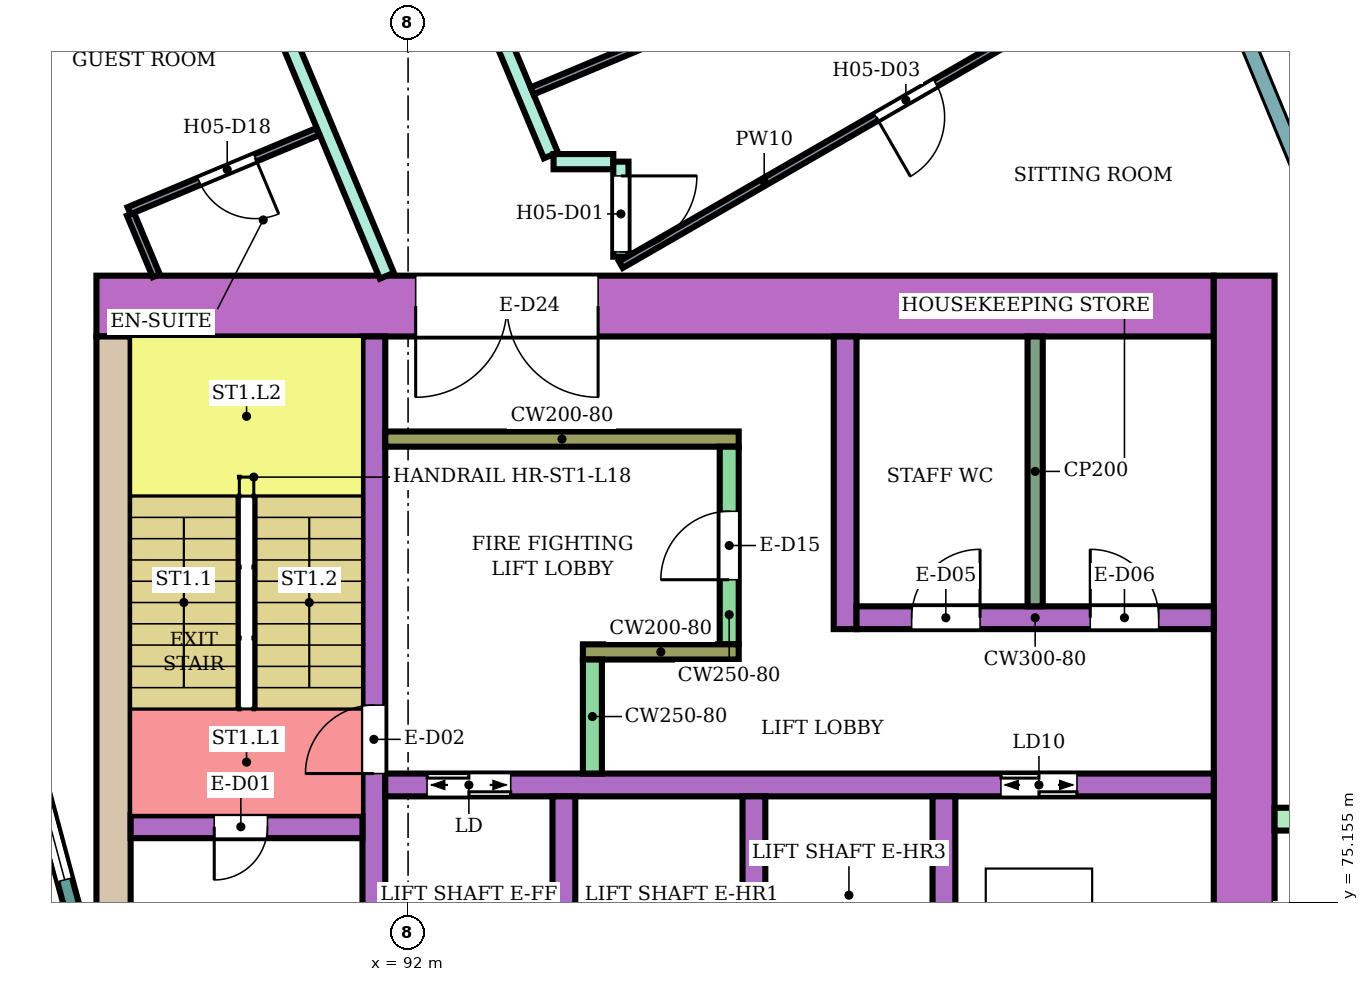
"""IFC4 building model, lengths in metres.
Left out: names, types, materials, properties, quantities, classifications, styles, units other than length and angle.
Written with IfcOpenShell. Run it as: python <this file> out.ifc"""

import sys

from ifc_helpers import new_model, si_unit, direction, frame, frame_2d, origin, place, context, subcontext, project, spatial, rectangle, extrude, element, fill, save


model = new_model("IFC4")
c1 = context("Model", 3, precision=1e-05, world=origin(), true_north=direction((0.0, 1.0)))
c2 = subcontext(c1, "Body", "Model", "MODEL_VIEW")
j1 = project(units=[si_unit("LENGTHUNIT", "METRE"), si_unit("PLANEANGLEUNIT", "RADIAN")], contexts=[c1])
p1 = place(None, origin())
s1 = spatial("IfcSite", under=j1, at=p1, CompositionType="ELEMENT")
p2 = place(p1, origin())
s2 = spatial("IfcBuilding", under=s1, at=p2, CompositionType="ELEMENT")
p3 = place(p2, frame((0.0, 0.0, 82.4)))
s3 = spatial("IfcBuildingStorey", under=s2, at=p3, CompositionType="ELEMENT", Elevation=82.4)
p4 = place(p3, frame((87.9, 83.0, 0.0), z_axis=(0.0, 0.0, 1.0), x_axis=(1.0, 0.0, 0.0)))
e1 = element("IfcWall", 1, at=p4, inside=s3, PredefinedType="SHEAR", context=c2, shape_type="SweptSolid", body=[
    extrude(rectangle(XDim=14.7, YDim=0.8, at=frame_2d((7.35, 0.0))), origin(), (0.0, 0.0, 1.0), 3.48),
])
p5 = place(p4, frame((4.2, 0.0, 0.0)))
e2 = element("IfcOpeningElement", 2, at=p5, cuts=e1, PredefinedType="OPENING", context=c2, shape_type="SweptSolid", body=[
    extrude(rectangle(XDim=2.4, YDim=2.4, at=frame_2d((1.2, 1.2))), frame((0.0, 0.41, 0.0), z_axis=(0.0, -1.0, 0.0), x_axis=(1.0, 0.0, 0.0)), (0.0, 0.0, 1.0), 0.82),
])
p6 = place(p3, frame((88.125, 75.0, 0.0), z_axis=(0.0, 0.0, 1.0), x_axis=(0.0, 1.0, 0.0)))
e3 = element("IfcWall", 3, at=p6, inside=s3, PredefinedType="SHEAR", context=c2, shape_type="SweptSolid", body=[
    extrude(rectangle(XDim=7.6, YDim=0.45, at=frame_2d((3.8, 0.0))), origin(), (0.0, 0.0, 1.0), 3.48),
])
p7 = place(p3, frame((103.0, 66.6, 0.0), z_axis=(0.0, 0.0, 1.0), x_axis=(0.0, 1.0, 0.0)))
e4 = element("IfcWall", 4, at=p7, inside=s3, PredefinedType="SHEAR", context=c2, shape_type="SweptSolid", body=[
    extrude(rectangle(XDim=16.8, YDim=0.8, at=frame_2d((8.4, 0.0))), origin(), (0.0, 0.0, 1.0), 3.48),
])
p8 = place(p3, frame((91.55, 75.0, 0.0), z_axis=(0.0, 0.0, 1.0), x_axis=(0.0, 1.0, 0.0)))
e5 = element("IfcWall", 5, at=p8, inside=s3, PredefinedType="SHEAR", context=c2, shape_type="SweptSolid", body=[
    extrude(rectangle(XDim=7.6, YDim=0.3, at=frame_2d((3.8, 0.0))), origin(), (0.0, 0.0, 1.0), 3.48),
])
p9 = place(p8, frame((1.85, 0.0, 0.0)))
e6 = element("IfcOpeningElement", 6, at=p9, cuts=e5, PredefinedType="OPENING", context=c2, shape_type="SweptSolid", body=[
    extrude(rectangle(XDim=0.9, YDim=2.1, at=frame_2d((0.45, 1.05))), frame((0.0, 0.16, 0.0), z_axis=(0.0, -1.0, 0.0), x_axis=(1.0, 0.0, 0.0)), (0.0, 0.0, 1.0), 0.32),
])
p10 = place(p3, frame((88.35, 76.15, 0.0), z_axis=(0.0, 0.0, 1.0), x_axis=(1.0, 0.0, 0.0)))
e7 = element("IfcWall", 7, at=p10, inside=s3, PredefinedType="SHEAR", context=c2, shape_type="SweptSolid", body=[
    extrude(rectangle(XDim=3.05, YDim=0.3, at=frame_2d((1.525, 0.0))), origin(), (0.0, 0.0, 1.0), 3.48),
])
p11 = place(p10, frame((1.1, 0.0, 0.0)))
e8 = element("IfcOpeningElement", 8, at=p11, cuts=e7, PredefinedType="OPENING", context=c2, shape_type="SweptSolid", body=[
    extrude(rectangle(XDim=0.7, YDim=2.0, at=frame_2d((0.35, 1.0))), frame((0.0, 0.16, 0.0), z_axis=(0.0, -1.0, 0.0), x_axis=(1.0, 0.0, 0.0)), (0.0, 0.0, 1.0), 0.32),
])
p12 = place(p3, frame((91.7, 76.7, 0.0), z_axis=(0.0, 0.0, 1.0), x_axis=(1.0, 0.0, 0.0)))
e9 = element("IfcWall", 9, at=p12, inside=s3, PredefinedType="SHEAR", context=c2, shape_type="SweptSolid", body=[
    extrude(rectangle(XDim=10.9, YDim=0.3, at=frame_2d((5.45, 0.0))), origin(), (0.0, 0.0, 1.0), 3.48),
])
p13 = place(p12, frame((0.55, 0.0, 0.0)))
e10 = element("IfcOpeningElement", 10, at=p13, cuts=e9, PredefinedType="OPENING", context=c2, shape_type="SweptSolid", body=[
    extrude(rectangle(XDim=1.1, YDim=2.1, at=frame_2d((0.55, 1.05))), frame((0.0, 0.16, 0.0), z_axis=(0.0, -1.0, 0.0), x_axis=(1.0, 0.0, 0.0)), (0.0, 0.0, 1.0), 0.32),
])
p14 = place(p12, frame((8.1, 0.0, 0.0)))
e11 = element("IfcOpeningElement", 11, at=p14, cuts=e9, PredefinedType="OPENING", context=c2, shape_type="SweptSolid", body=[
    extrude(rectangle(XDim=1.0, YDim=2.1, at=frame_2d((0.5, 1.05))), frame((0.0, 0.16, 0.0), z_axis=(0.0, -1.0, 0.0), x_axis=(1.0, 0.0, 0.0)), (0.0, 0.0, 1.0), 0.32),
])
for number, where, z_axis, x_axis in (
    (12, (94.05, 74.0, 0.0), (0.0, 0.0, 1.0), (0.0, 1.0, 0.0)),
    (13, (96.55, 74.0, 0.0), (0.0, 0.0, 1.0), (0.0, 1.0, 0.0)),
    (14, (99.05, 74.0, 0.0), (0.0, 0.0, 1.0), (0.0, 1.0, 0.0)),
):
    element("IfcWall", number, at=place(p3, frame(where, z_axis=z_axis, x_axis=x_axis)), inside=s3, PredefinedType="SHEAR", context=c2, shape_type="SweptSolid", body=[
        extrude(rectangle(XDim=2.55, YDim=0.3, at=frame_2d((1.275, 0.0))), origin(), (0.0, 0.0, 1.0), 3.48),
    ])
p15 = place(p3, frame((91.7, 81.25, 0.0), z_axis=(0.0, 0.0, 1.0), x_axis=(1.0, 0.0, 0.0)))
e15 = element("IfcWall", 15, at=p15, inside=s3, PredefinedType="SHEAR", context=c2, shape_type="SweptSolid", body=[
    extrude(rectangle(XDim=4.65, YDim=0.2, at=frame_2d((2.325, 0.0))), origin(), (0.0, 0.0, 1.0), 3.48),
])
p16 = place(p3, frame((96.225, 78.55, 0.0), z_axis=(0.0, 0.0, 1.0), x_axis=(0.0, 1.0, 0.0)))
e16 = element("IfcWall", 16, at=p16, inside=s3, PredefinedType="SHEAR", context=c2, shape_type="SweptSolid", body=[
    extrude(rectangle(XDim=2.6, YDim=0.25, at=frame_2d((1.3, 0.0))), origin(), (0.0, 0.0, 1.0), 3.48),
])
p17 = place(p16, frame((0.85, 0.0, 0.0)))
e17 = element("IfcOpeningElement", 17, at=p17, cuts=e16, PredefinedType="OPENING", context=c2, shape_type="SweptSolid", body=[
    extrude(rectangle(XDim=0.9, YDim=2.1, at=frame_2d((0.45, 1.05))), frame((0.0, 0.135, 0.0), z_axis=(0.0, -1.0, 0.0), x_axis=(1.0, 0.0, 0.0)), (0.0, 0.0, 1.0), 0.27),
])
p18 = place(p3, frame((94.3, 78.45, 0.0), z_axis=(0.0, 0.0, 1.0), x_axis=(1.0, 0.0, 0.0)))
e18 = element("IfcWall", 18, at=p18, inside=s3, PredefinedType="SHEAR", context=c2, shape_type="SweptSolid", body=[
    extrude(rectangle(XDim=2.05, YDim=0.2, at=frame_2d((1.025, 0.0))), origin(), (0.0, 0.0, 1.0), 3.48),
])
p19 = place(p3, frame((94.425, 76.85, 0.0), z_axis=(0.0, 0.0, 1.0), x_axis=(0.0, 1.0, 0.0)))
e19 = element("IfcWall", 19, at=p19, inside=s3, PredefinedType="SHEAR", context=c2, shape_type="SweptSolid", body=[
    extrude(rectangle(XDim=1.5, YDim=0.25, at=frame_2d((0.75, 0.0))), origin(), (0.0, 0.0, 1.0), 3.48),
])
p20 = place(p3, frame((97.75, 78.75, 0.0), z_axis=(0.0, 0.0, 1.0), x_axis=(0.0, 1.0, 0.0)))
e20 = element("IfcWall", 20, at=p20, inside=s3, PredefinedType="SHEAR", context=c2, shape_type="SweptSolid", body=[
    extrude(rectangle(XDim=3.85, YDim=0.3, at=frame_2d((1.925, 0.0))), origin(), (0.0, 0.0, 1.0), 3.48),
])
p21 = place(p3, frame((97.9, 78.9, 0.0), z_axis=(0.0, 0.0, 1.0), x_axis=(1.0, 0.0, 0.0)))
e21 = element("IfcWall", 21, at=p21, inside=s3, PredefinedType="SHEAR", context=c2, shape_type="SweptSolid", body=[
    extrude(rectangle(XDim=4.7, YDim=0.3, at=frame_2d((2.35, 0.0))), origin(), (0.0, 0.0, 1.0), 3.48),
])
p22 = place(p21, frame((0.725, 0.0, 0.0)))
e22 = element("IfcOpeningElement", 22, at=p22, cuts=e21, PredefinedType="OPENING", context=c2, shape_type="SweptSolid", body=[
    extrude(rectangle(XDim=0.9, YDim=2.1, at=frame_2d((0.45, 1.05))), frame((0.0, 0.16, 0.0), z_axis=(0.0, -1.0, 0.0), x_axis=(1.0, 0.0, 0.0)), (0.0, 0.0, 1.0), 0.32),
])
p23 = place(p21, frame((3.075, 0.0, 0.0)))
e23 = element("IfcOpeningElement", 23, at=p23, cuts=e21, PredefinedType="OPENING", context=c2, shape_type="SweptSolid", body=[
    extrude(rectangle(XDim=0.9, YDim=2.1, at=frame_2d((0.45, 1.05))), frame((0.0, 0.16, 0.0), z_axis=(0.0, -1.0, 0.0), x_axis=(1.0, 0.0, 0.0)), (0.0, 0.0, 1.0), 0.32),
])
p24 = place(p3, frame((103.4, 76.25, 0.0), z_axis=(0.0, 0.0, 1.0), x_axis=(1.0, 0.0, 0.0)))
e24 = element("IfcWall", 24, at=p24, inside=s3, PredefinedType="NOTDEFINED", context=c2, shape_type="SweptSolid", body=[
    extrude(rectangle(XDim=2.416, YDim=0.3, at=frame_2d((1.208, 0.0))), origin(), (0.0, 0.0, 1.0), 3.8),
])
p25 = place(p3, frame((87.604, 75.0, 0.0), z_axis=(0.0, 0.0, 1.0), x_axis=(-0.258789828301, 0.965933654434, 0.0)))
e25 = element("IfcWall", 25, at=p25, inside=s3, PredefinedType="NOTDEFINED", context=c2, shape_type="SweptSolid", body=[
    extrude(rectangle(XDim=3.936, YDim=0.2, at=frame_2d((1.968, 0.0))), origin(), (0.0, 0.0, 1.0), 3.8),
])
p26 = place(p25, frame((0.468, 0.0, 0.9)))
e26 = element("IfcOpeningElement", 26, at=p26, cuts=e25, PredefinedType="OPENING", context=c2, shape_type="SweptSolid", body=[
    extrude(rectangle(XDim=3.0, YDim=2.3, at=frame_2d((1.5, 1.15))), frame((0.0, 0.11, 0.0), z_axis=(0.0, -1.0, 0.0), x_axis=(1.0, 0.0, 0.0)), (0.0, 0.0, 1.0), 0.22),
])
p27 = place(p3, frame((83.85, 81.667, 0.0), z_axis=(0.0, 0.0, 1.0), x_axis=(0.500222212082, 0.865897071562, 0.0)))
e27 = element("IfcWall", 27, at=p27, inside=s3, PredefinedType="PARTITIONING", context=c2, shape_type="SweptSolid", body=[
    extrude(rectangle(XDim=9.768, YDim=0.2, at=frame_2d((4.884, 0.0))), origin(), (0.0, 0.0, 1.0), 3.35),
])
p28 = place(p3, frame((88.698, 90.624, 0.0), z_axis=(0.0, 0.0, 1.0), x_axis=(0.386027055918, -0.922487459047, 0.0)))
e28 = element("IfcWall", 28, at=p28, inside=s3, PredefinedType="PARTITIONING", context=c2, shape_type="SweptSolid", body=[
    extrude(rectangle(XDim=7.832, YDim=0.2, at=frame_2d((3.916, 0.0))), origin(), (0.0, 0.0, 1.0), 3.35),
])
p29 = place(p28, frame((1.482, 0.0, 0.0)))
e29 = element("IfcOpeningElement", 29, at=p29, cuts=e28, PredefinedType="OPENING", context=c2, shape_type="SweptSolid", body=[
    extrude(rectangle(XDim=1.0, YDim=2.1, at=frame_2d((0.5, 1.05))), frame((0.0, 0.11, 0.0), z_axis=(0.0, -1.0, 0.0), x_axis=(1.0, 0.0, 0.0)), (0.0, 0.0, 1.0), 0.22),
])
p30 = place(p3, frame((90.604, 92.805, 0.0), z_axis=(0.0, 0.0, 1.0), x_axis=(0.386209298583, -0.922411176042, 0.0)))
e30 = element("IfcWall", 30, at=p30, inside=s3, PredefinedType="PARTITIONING", context=c2, shape_type="SweptSolid", body=[
    extrude(rectangle(XDim=8.48, YDim=0.2, at=frame_2d((4.24, 0.0))), origin(), (0.0, 0.0, 1.0), 3.35),
])
p31 = place(p30, frame((3.723, 0.0, 0.0)))
e31 = element("IfcOpeningElement", 31, at=p31, cuts=e30, PredefinedType="OPENING", context=c2, shape_type="SweptSolid", body=[
    extrude(rectangle(XDim=1.1, YDim=2.1, at=frame_2d((0.55, 1.05))), frame((0.0, 0.11, 0.0), z_axis=(0.0, -1.0, 0.0), x_axis=(1.0, 0.0, 0.0)), (0.0, 0.0, 1.0), 0.22),
])
p32 = place(p3, frame((93.914, 84.9, 0.0), z_axis=(0.0, 0.0, 1.0), x_axis=(1.0, 0.0, 0.0)))
e32 = element("IfcWall", 32, at=p32, inside=s3, PredefinedType="PARTITIONING", context=c2, shape_type="SweptSolid", body=[
    extrude(rectangle(XDim=0.786, YDim=0.2, at=frame_2d((0.393, 0.0))), origin(), (0.0, 0.0, 1.0), 3.35),
])
p33 = place(p3, frame((94.8, 83.65, 0.0), z_axis=(0.0, 0.0, 1.0), x_axis=(0.0, 1.0, 0.0)))
e33 = element("IfcWall", 33, at=p33, inside=s3, PredefinedType="PARTITIONING", context=c2, shape_type="SweptSolid", body=[
    extrude(rectangle(XDim=1.25, YDim=0.2, at=frame_2d((0.625, 0.0))), origin(), (0.0, 0.0, 1.0), 3.35),
])
p34 = place(p33, frame((0.062, 0.0, 0.0)))
e34 = element("IfcOpeningElement", 34, at=p34, cuts=e33, PredefinedType="OPENING", context=c2, shape_type="SweptSolid", body=[
    extrude(rectangle(XDim=1.0, YDim=2.1, at=frame_2d((0.5, 1.05))), frame((0.0, 0.11, 0.0), z_axis=(0.0, -1.0, 0.0), x_axis=(1.0, 0.0, 0.0)), (0.0, 0.0, 1.0), 0.22),
])
p35 = place(p3, frame((88.348, 84.209, 0.0), z_axis=(0.0, 0.0, 1.0), x_axis=(0.386077497504, -0.922466349479, 0.0)))
e35 = element("IfcWall", 35, at=p35, inside=s3, PredefinedType="PARTITIONING", context=c2, shape_type="SweptSolid", body=[
    extrude(rectangle(XDim=0.877, YDim=0.1, at=frame_2d((0.438, 0.0))), origin(), (0.0, 0.0, 1.0), 3.35),
])
p36 = place(p3, frame((88.329, 84.255, 0.0), z_axis=(0.0, 0.0, 1.0), x_axis=(0.922320663728, 0.386425404522, 0.0)))
e36 = element("IfcWall", 36, at=p36, inside=s3, PredefinedType="PARTITIONING", context=c2, shape_type="SweptSolid", body=[
    extrude(rectangle(XDim=2.69, YDim=0.1, at=frame_2d((1.345, 0.0))), origin(), (0.0, 0.0, 1.0), 3.35),
])
p37 = place(p36, frame((1.0, 0.0, 0.0)))
e37 = element("IfcOpeningElement", 37, at=p37, cuts=e36, PredefinedType="OPENING", context=c2, shape_type="SweptSolid", body=[
    extrude(rectangle(XDim=0.8, YDim=2.1, at=frame_2d((0.4, 1.05))), frame((0.0, 0.06, 0.0), z_axis=(0.0, -1.0, 0.0), x_axis=(1.0, 0.0, 0.0)), (0.0, 0.0, 1.0), 0.12),
])
p38 = place(p3, frame((93.633, 85.831, 0.0), z_axis=(0.0, 0.0, 1.0), x_axis=(0.922344808264, 0.38636777126, 0.0)))
e38 = element("IfcWall", 38, at=p38, inside=s3, PredefinedType="PARTITIONING", context=c2, shape_type="SweptSolid", body=[
    extrude(rectangle(XDim=2.65, YDim=0.1, at=frame_2d((1.325, 0.0))), origin(), (0.0, 0.0, 1.0), 3.35),
])
p39 = place(p3, frame((94.8, 83.545, 0.0), z_axis=(0.0, 0.0, 1.0), x_axis=(0.86602264145, 0.500004784474, 0.0)))
e39 = element("IfcWall", 39, at=p39, inside=s3, PredefinedType="PARTITIONING", context=c2, shape_type="SweptSolid", body=[
    extrude(rectangle(XDim=8.708, YDim=0.1, at=frame_2d((4.354, 0.0))), origin(), (0.0, 0.0, 1.0), 3.35),
])
p40 = place(p39, frame((3.879, 0.0, 0.0)))
e40 = element("IfcOpeningElement", 40, at=p40, cuts=e39, PredefinedType="OPENING", context=c2, shape_type="SweptSolid", body=[
    extrude(rectangle(XDim=0.9, YDim=2.1, at=frame_2d((0.45, 1.05))), frame((0.0, 0.06, 0.0), z_axis=(0.0, -1.0, 0.0), x_axis=(1.0, 0.0, 0.0)), (0.0, 0.0, 1.0), 0.12),
])
p41 = place(p3, frame((100.25, 79.05, 0.0), z_axis=(0.0, 0.0, 1.0), x_axis=(0.0, 1.0, 0.0)))
e41 = element("IfcWall", 41, at=p41, inside=s3, PredefinedType="PARTITIONING", context=c2, shape_type="SweptSolid", body=[
    extrude(rectangle(XDim=3.55, YDim=0.2, at=frame_2d((1.775, 0.0))), origin(), (0.0, 0.0, 1.0), 3.48),
])
p42 = place(p26, origin())
e42 = element("IfcWindow", 42, at=p42, inside=s3, PartitioningType="SINGLE_PANEL", PredefinedType="WINDOW", context=c2, shape_type="SweptSolid", body=[
    extrude(rectangle(XDim=3.0, YDim=2.3, at=frame_2d((1.5, 1.15))), frame((0.0, 0.03, 0.0), z_axis=(0.0, -1.0, 0.0), x_axis=(1.0, 0.0, 0.0)), (0.0, 0.0, 1.0), 0.06),
])
fill(e26, e42)
p43 = place(p34, frame((1.0, 0.0, 0.0), z_axis=(0.0, 0.0, 1.0), x_axis=(-1.0, 0.0, 0.0)))
e43 = element("IfcDoor", 43, at=p43, inside=s3, OperationType="SINGLE_SWING_LEFT", PredefinedType="DOOR", context=c2, shape_type="SweptSolid", body=[
    extrude(rectangle(XDim=1.0, YDim=2.1, at=frame_2d((0.5, 1.05))), frame((0.0, 0.025, 0.0), z_axis=(0.0, -1.0, 0.0), x_axis=(1.0, 0.0, 0.0)), (0.0, 0.0, 1.0), 0.05),
])
fill(e34, e43)
p44 = place(p40, frame((0.9, 0.0, 0.0), z_axis=(0.0, 0.0, 1.0), x_axis=(-1.0, 0.0, 0.0)))
e44 = element("IfcDoor", 44, at=p44, inside=s3, OperationType="SINGLE_SWING_RIGHT", PredefinedType="DOOR", context=c2, shape_type="SweptSolid", body=[
    extrude(rectangle(XDim=0.9, YDim=2.1, at=frame_2d((0.45, 1.05))), frame((0.0, 0.025, 0.0), z_axis=(0.0, -1.0, 0.0), x_axis=(1.0, 0.0, 0.0)), (0.0, 0.0, 1.0), 0.05),
])
fill(e40, e44)
p45 = place(p37, frame((0.8, 0.0, 0.0), z_axis=(0.0, 0.0, 1.0), x_axis=(-1.0, 0.0, 0.0)))
e45 = element("IfcDoor", 45, at=p45, inside=s3, OperationType="SINGLE_SWING_LEFT", PredefinedType="DOOR", context=c2, shape_type="SweptSolid", body=[
    extrude(rectangle(XDim=0.8, YDim=2.1, at=frame_2d((0.4, 1.05))), frame((0.0, 0.025, 0.0), z_axis=(0.0, -1.0, 0.0), x_axis=(1.0, 0.0, 0.0)), (0.0, 0.0, 1.0), 0.05),
])
fill(e37, e45)
p46 = place(p11, frame((0.7, 0.0, 0.0), z_axis=(0.0, 0.0, 1.0), x_axis=(-1.0, 0.0, 0.0)))
e46 = element("IfcDoor", 46, at=p46, inside=s3, OperationType="SINGLE_SWING_RIGHT", PredefinedType="DOOR", context=c2, shape_type="SweptSolid", body=[
    extrude(rectangle(XDim=0.7, YDim=2.0, at=frame_2d((0.35, 1.0))), frame((0.0, 0.025, 0.0), z_axis=(0.0, -1.0, 0.0), x_axis=(1.0, 0.0, 0.0)), (0.0, 0.0, 1.0), 0.05),
])
fill(e8, e46)
p47 = place(p9, origin())
e47 = element("IfcDoor", 47, at=p47, inside=s3, OperationType="SINGLE_SWING_LEFT", PredefinedType="DOOR", context=c2, shape_type="SweptSolid", body=[
    extrude(rectangle(XDim=0.9, YDim=2.1, at=frame_2d((0.45, 1.05))), frame((0.0, 0.025, 0.0), z_axis=(0.0, -1.0, 0.0), x_axis=(1.0, 0.0, 0.0)), (0.0, 0.0, 1.0), 0.05),
])
fill(e6, e47)
p48 = place(p13, origin())
e48 = element("IfcDoor", 48, at=p48, inside=s3, OperationType="DOUBLE_DOOR_SLIDING", PredefinedType="DOOR", context=c2, shape_type="SweptSolid", body=[
    extrude(rectangle(XDim=1.1, YDim=2.1, at=frame_2d((0.55, 1.05))), frame((0.0, 0.025, 0.0), z_axis=(0.0, -1.0, 0.0), x_axis=(1.0, 0.0, 0.0)), (0.0, 0.0, 1.0), 0.05),
])
fill(e10, e48)
p49 = place(p14, origin())
e49 = element("IfcDoor", 49, at=p49, inside=s3, OperationType="DOUBLE_DOOR_SLIDING", PredefinedType="DOOR", context=c2, shape_type="SweptSolid", body=[
    extrude(rectangle(XDim=1.0, YDim=2.1, at=frame_2d((0.5, 1.05))), frame((0.0, 0.025, 0.0), z_axis=(0.0, -1.0, 0.0), x_axis=(1.0, 0.0, 0.0)), (0.0, 0.0, 1.0), 0.05),
])
fill(e11, e49)
p50 = place(p17, origin())
e50 = element("IfcDoor", 50, at=p50, inside=s3, OperationType="SINGLE_SWING_LEFT", PredefinedType="DOOR", context=c2, shape_type="SweptSolid", body=[
    extrude(rectangle(XDim=0.9, YDim=2.1, at=frame_2d((0.45, 1.05))), frame((0.0, 0.025, 0.0), z_axis=(0.0, -1.0, 0.0), x_axis=(1.0, 0.0, 0.0)), (0.0, 0.0, 1.0), 0.05),
])
fill(e17, e50)
p51 = place(p22, origin())
e51 = element("IfcDoor", 51, at=p51, inside=s3, OperationType="SINGLE_SWING_RIGHT", PredefinedType="DOOR", context=c2, shape_type="SweptSolid", body=[
    extrude(rectangle(XDim=0.9, YDim=2.1, at=frame_2d((0.45, 1.05))), frame((0.0, 0.025, 0.0), z_axis=(0.0, -1.0, 0.0), x_axis=(1.0, 0.0, 0.0)), (0.0, 0.0, 1.0), 0.05),
])
fill(e22, e51)
p52 = place(p23, origin())
e52 = element("IfcDoor", 52, at=p52, inside=s3, OperationType="SINGLE_SWING_LEFT", PredefinedType="DOOR", context=c2, shape_type="SweptSolid", body=[
    extrude(rectangle(XDim=0.9, YDim=2.1, at=frame_2d((0.45, 1.05))), frame((0.0, 0.025, 0.0), z_axis=(0.0, -1.0, 0.0), x_axis=(1.0, 0.0, 0.0)), (0.0, 0.0, 1.0), 0.05),
])
fill(e23, e52)
p53 = place(p5, frame((2.4, 0.0, 0.0), z_axis=(0.0, 0.0, 1.0), x_axis=(-1.0, 0.0, 0.0)))
e53 = element("IfcDoor", 53, at=p53, inside=s3, OperationType="DOUBLE_DOOR_SINGLE_SWING", PredefinedType="DOOR", context=c2, shape_type="SweptSolid", body=[
    extrude(rectangle(XDim=2.4, YDim=2.4, at=frame_2d((1.2, 1.2))), frame((0.0, 0.025, 0.0), z_axis=(0.0, -1.0, 0.0), x_axis=(1.0, 0.0, 0.0)), (0.0, 0.0, 1.0), 0.05),
])
fill(e2, e53)
save(model, sys.argv[1])
